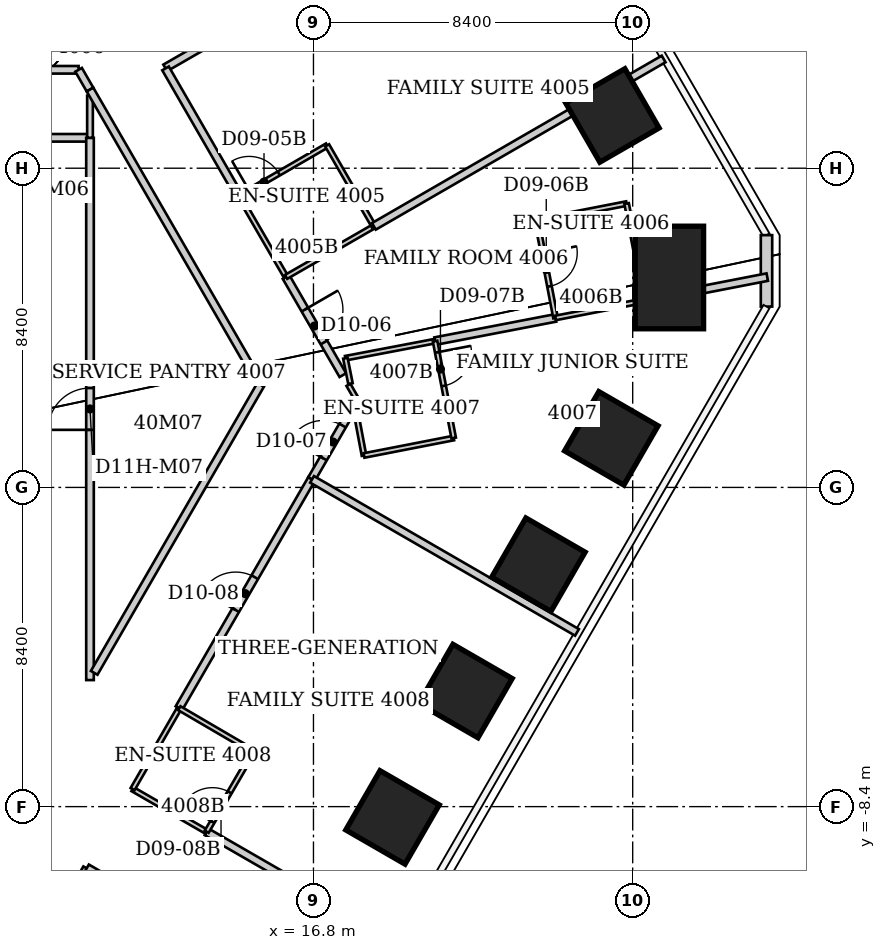
"""IFC4 building model, lengths in metres.
Left out: names, types, materials, properties, quantities, classifications, styles, units other than length and angle.
Written with IfcOpenShell. Run it as: python <this file> out.ifc"""

import sys

from ifc_helpers import new_model, si_unit, direction, frame, frame_2d, origin, origin_2d, place, context, subcontext, project, spatial, rectangle, extrude, element, fill, save


model = new_model("IFC4")
c1 = context("Model", 3, precision=1e-05, world=origin(), true_north=direction((0.0, 1.0)))
c2 = subcontext(c1, "Body", "Model", "MODEL_VIEW")
j1 = project(units=[si_unit("LENGTHUNIT", "METRE"), si_unit("PLANEANGLEUNIT", "RADIAN")], contexts=[c1])
p1 = place(None, origin())
s1 = spatial("IfcSite", under=j1, at=p1, CompositionType="ELEMENT")
p2 = place(p1, origin())
s2 = spatial("IfcBuilding", under=s1, at=p2, CompositionType="ELEMENT")
p3 = place(p2, frame((0.0, 0.0, 161.4)))
s3 = spatial("IfcBuildingStorey", under=s2, at=p3, CompositionType="ELEMENT", Elevation=161.4)
p4 = place(p3, frame((24.665, 9.788, 0.0), z_axis=(-0.055410421986, -0.021997424469, 0.99822131737), x_axis=(0.864198060677, 0.499682708675, 0.058982222519)))
e1 = element("IfcColumn", 1, at=p4, inside=s3, PredefinedType="COLUMN", context=c2, shape_type="SweptSolid", body=[
    extrude(rectangle(XDim=1.8, YDim=1.8, at=origin_2d()), origin(), (0.0, 0.0, 1.0), 3.807),
])
p5 = place(p3, frame((26.166, 5.524, 0.0), z_axis=(-0.06021332392, -0.012696739229, 0.998104778285), x_axis=(0.998185498237, -0.001024676941, 0.060205158806)))
e2 = element("IfcColumn", 2, at=p5, inside=s3, PredefinedType="COLUMN", context=c2, shape_type="SweptSolid", body=[
    extrude(rectangle(XDim=1.8, YDim=2.7, at=origin_2d()), origin(), (0.0, 0.0, 1.0), 3.807),
])
p6 = place(p3, frame((24.638, 1.292, 0.0), z_axis=(-0.056190949949, -0.002950666322, 0.998415680322), x_axis=(0.864380324341, -0.500621456598, 0.047167913724)))
e3 = element("IfcColumn", 3, at=p6, inside=s3, PredefinedType="COLUMN", context=c2, shape_type="SweptSolid", body=[
    extrude(rectangle(XDim=1.8, YDim=1.8, at=origin_2d()), origin(), (0.0, 0.0, 1.0), 3.806),
])
p7 = place(p3, frame((22.719, -2.033, 0.0), z_axis=(-0.05184096697, 0.004683651719, 0.998644369909), x_axis=(0.8641219969, -0.501063474394, 0.047207722912)))
e4 = element("IfcColumn", 4, at=p7, inside=s3, PredefinedType="COLUMN", context=c2, shape_type="SweptSolid", body=[
    extrude(rectangle(XDim=1.8, YDim=1.8, at=origin_2d()), origin(), (0.0, 0.0, 1.0), 3.805),
])
p8 = place(p3, frame((20.8, -5.358, 0.0), z_axis=(-0.047485394503, 0.012192195886, 0.998797520856), x_axis=(0.865155048747, -0.499275895122, 0.047226286935)))
e5 = element("IfcColumn", 5, at=p8, inside=s3, PredefinedType="COLUMN", context=c2, shape_type="SweptSolid", body=[
    extrude(rectangle(XDim=1.8, YDim=1.8, at=origin_2d()), origin(), (0.0, 0.0, 1.0), 3.805),
])
p9 = place(p3, frame((18.88, -8.684, 0.0), z_axis=(-0.043125124656, 0.019829856427, 0.998872864992), x_axis=(0.865002196318, -0.499537256443, 0.047262350669)))
e6 = element("IfcColumn", 6, at=p9, inside=s3, PredefinedType="COLUMN", context=c2, shape_type="SweptSolid", body=[
    extrude(rectangle(XDim=1.8, YDim=1.8, at=origin_2d()), origin(), (0.0, 0.0, 1.0), 3.804),
])
p10 = place(p3, frame((28.721, 6.638, 0.0), z_axis=(0.0, 0.0, 1.0), x_axis=(0.0, -1.0, 0.0)))
e7 = element("IfcWall", 7, at=p10, inside=s3, PredefinedType="SOLIDWALL", context=c2, shape_type="SweptSolid", body=[
    extrude(rectangle(XDim=1.88, YDim=0.3, at=frame_2d((0.94, 0.0))), origin(), (0.0, 0.0, 1.0), 3.64),
])
p11 = place(p3, frame((6.44, 10.99, 0.0), z_axis=(0.0, 0.0, 1.0), x_axis=(1.0, 0.0, 0.0)))
e8 = element("IfcWall", 8, at=p11, inside=s3, PredefinedType="PARTITIONING", context=c2, shape_type="SweptSolid", body=[
    extrude(rectangle(XDim=4.18, YDim=0.2, at=frame_2d((2.09, 0.0))), origin(), (0.0, 0.0, 1.0), 3.64),
])
p12 = place(p3, frame((8.53, -14.01, 0.0), z_axis=(0.0, 0.0, 1.0), x_axis=(0.500091179446, 0.865972754907, 0.0)))
e9 = element("IfcWall", 9, at=p12, inside=s3, PredefinedType="PARTITIONING", context=c2, shape_type="SweptSolid", body=[
    extrude(rectangle(XDim=4.604, YDim=0.2, at=frame_2d((2.302, 0.0))), origin(), (0.0, 0.0, 1.0), 3.64),
])
p13 = place(p3, frame((10.62, 10.99, 0.0), z_axis=(0.0, 0.0, 1.0), x_axis=(0.499464218792, -0.866334516308, 0.0)))
e10 = element("IfcWall", 10, at=p13, inside=s3, PredefinedType="PARTITIONING", context=c2, shape_type="SweptSolid", body=[
    extrude(rectangle(XDim=0.6, YDim=0.2, at=frame_2d((0.3, 0.0))), origin(), (0.0, 0.0, 1.0), 3.64),
])
p14 = place(p3, frame((10.84, -10.01, 0.0), z_axis=(0.0, 0.0, 1.0), x_axis=(0.865552592802, -0.500818039904, 0.0)))
e11 = element("IfcWall", 11, at=p14, inside=s3, PredefinedType="PARTITIONING", context=c2, shape_type="SweptSolid", body=[
    extrude(rectangle(XDim=5.072, YDim=0.2, at=frame_2d((2.536, 0.0))), origin(), (0.0, 0.0, 1.0), 3.64),
])
p15 = place(p14, frame((2.036, 0.0, 0.0)))
e12 = element("IfcOpeningElement", 12, at=p15, cuts=e11, PredefinedType="OPENING", context=c2, shape_type="SweptSolid", body=[
    extrude(rectangle(XDim=1.0, YDim=2.13, at=frame_2d((0.5, 1.065))), frame((0.0, 0.1, 0.0), z_axis=(0.0, -1.0, 0.0), x_axis=(1.0, 0.0, 0.0)), (0.0, 0.0, 1.0), 0.2),
])
p16 = place(p3, frame((10.905, 9.2, 0.0), z_axis=(0.0, 0.0, 1.0), x_axis=(-1.0, 0.0, 0.0)))
e13 = element("IfcWall", 13, at=p16, inside=s3, PredefinedType="PARTITIONING", context=c2, shape_type="SweptSolid", body=[
    extrude(rectangle(XDim=4.465, YDim=0.2, at=frame_2d((2.232, 0.0))), origin(), (0.0, 0.0, 1.0), 3.64),
])
p17 = place(p16, frame((1.683, 0.0, 0.0)))
e14 = element("IfcOpeningElement", 14, at=p17, cuts=e13, PredefinedType="OPENING", context=c2, shape_type="SweptSolid", body=[
    extrude(rectangle(XDim=1.1, YDim=2.2, at=frame_2d((0.55, 1.1))), frame((0.0, 0.1, 0.0), z_axis=(0.0, -1.0, 0.0), x_axis=(1.0, 0.0, 0.0)), (0.0, 0.0, 1.0), 0.2),
])
p18 = place(p3, frame((10.92, -5.07, 0.0), z_axis=(0.0, 0.0, 1.0), x_axis=(0.0, 1.0, 0.0)))
e15 = element("IfcWall", 15, at=p18, inside=s3, PredefinedType="PARTITIONING", context=c2, shape_type="SweptSolid", body=[
    extrude(rectangle(XDim=14.27, YDim=0.2, at=frame_2d((7.135, 0.0))), origin(), (0.0, 0.0, 1.0), 3.64),
])
p19 = place(p18, frame((6.585, 0.0, 0.0)))
e16 = element("IfcOpeningElement", 16, at=p19, cuts=e15, PredefinedType="OPENING", context=c2, shape_type="SweptSolid", body=[
    extrude(rectangle(XDim=1.1, YDim=2.2, at=frame_2d((0.55, 1.1))), frame((0.0, 0.1, 0.0), z_axis=(0.0, -1.0, 0.0), x_axis=(1.0, 0.0, 0.0)), (0.0, 0.0, 1.0), 0.2),
])
p20 = place(p3, frame((10.92, 10.31, 0.0), z_axis=(0.0, 0.0, 1.0), x_axis=(0.0, -1.0, 0.0)))
e17 = element("IfcWall", 17, at=p20, inside=s3, PredefinedType="PARTITIONING", context=c2, shape_type="SweptSolid", body=[
    extrude(rectangle(XDim=1.11, YDim=0.15, at=frame_2d((0.555, 0.0))), origin(), (0.0, 0.0, 1.0), 3.64),
])
p21 = place(p3, frame((10.92, 10.47, 0.0), z_axis=(0.0, 0.0, 1.0), x_axis=(0.500331533983, -0.865833907919, 0.0)))
e18 = element("IfcWall", 18, at=p21, inside=s3, PredefinedType="PARTITIONING", context=c2, shape_type="SweptSolid", body=[
    extrude(rectangle(XDim=8.974, YDim=0.2, at=frame_2d((4.487, 0.0))), origin(), (0.0, 0.0, 1.0), 3.64),
])
p22 = place(p3, frame((12.04, -7.94, 0.0), z_axis=(0.0, 0.0, 1.0), x_axis=(0.866366273901, -0.499409130319, 0.0)))
e19 = element("IfcWall", 19, at=p22, inside=s3, PredefinedType="PARTITIONING", context=c2, shape_type="SweptSolid", body=[
    extrude(rectangle(XDim=2.249, YDim=0.12, at=frame_2d((1.125, 0.0))), origin(), (0.0, 0.0, 1.0), 3.64),
])
p23 = place(p3, frame((12.9, 11.04, 0.0), z_axis=(0.0, 0.0, 1.0), x_axis=(0.86631698263, 0.499494630209, 0.0)))
e20 = element("IfcWall", 20, at=p23, inside=s3, PredefinedType="PARTITIONING", context=c2, shape_type="SweptSolid", body=[
    extrude(rectangle(XDim=8.288, YDim=0.2, at=frame_2d((4.144, 0.0))), origin(), (0.0, 0.0, 1.0), 3.64),
])
p24 = place(p23, frame((3.644, 0.0, 0.0)))
e21 = element("IfcOpeningElement", 21, at=p24, cuts=e20, PredefinedType="OPENING", context=c2, shape_type="SweptSolid", body=[
    extrude(rectangle(XDim=1.0, YDim=2.13, at=frame_2d((0.5, 1.065))), frame((0.0, 0.1, 0.0), z_axis=(0.0, -1.0, 0.0), x_axis=(1.0, 0.0, 0.0)), (0.0, 0.0, 1.0), 0.2),
])
p25 = place(p3, frame((12.907, 11.027, 0.0), z_axis=(0.0, 0.0, 1.0), x_axis=(0.499726078095, -0.86618349492, 0.0)))
e22 = element("IfcWall", 22, at=p25, inside=s3, PredefinedType="PARTITIONING", context=c2, shape_type="SweptSolid", body=[
    extrude(rectangle(XDim=3.887, YDim=0.2, at=frame_2d((1.944, 0.0))), origin(), (0.0, 0.0, 1.0), 3.64),
])
p26 = place(p3, frame((13.26, -5.81, 0.0), z_axis=(0.0, 0.0, 1.0), x_axis=(0.500920236046, 0.865493452962, 0.0)))
e23 = element("IfcWall", 23, at=p26, inside=s3, PredefinedType="PARTITIONING", context=c2, shape_type="SweptSolid", body=[
    extrude(rectangle(XDim=6.967, YDim=0.2, at=frame_2d((3.483, 0.0))), origin(), (0.0, 0.0, 1.0), 3.64),
])
p27 = place(p26, frame((2.984, 0.0, 0.0)))
e24 = element("IfcOpeningElement", 24, at=p27, cuts=e23, PredefinedType="OPENING", context=c2, shape_type="SweptSolid", body=[
    extrude(rectangle(XDim=1.0, YDim=2.13, at=frame_2d((0.5, 1.065))), frame((0.0, 0.1, 0.0), z_axis=(0.0, -1.0, 0.0), x_axis=(1.0, 0.0, 0.0)), (0.0, 0.0, 1.0), 0.2),
])
p28 = place(p3, frame((13.27, -5.81, 0.0), z_axis=(0.0, 0.0, 1.0), x_axis=(-0.500089055364, -0.86597398154, 0.0)))
e25 = element("IfcWall", 25, at=p28, inside=s3, PredefinedType="PARTITIONING", context=c2, shape_type="SweptSolid", body=[
    extrude(rectangle(XDim=2.459, YDim=0.12, at=frame_2d((1.23, 0.0))), origin(), (0.0, 0.0, 1.0), 3.64),
])
p29 = place(p3, frame((13.988, -9.063, 0.0), z_axis=(0.0, 0.0, 1.0), x_axis=(0.86644076383, -0.499279884207, 0.0)))
e26 = element("IfcWall", 26, at=p29, inside=s3, PredefinedType="PARTITIONING", context=c2, shape_type="SweptSolid", body=[
    extrude(rectangle(XDim=2.818, YDim=0.2, at=frame_2d((1.409, 0.0))), origin(), (0.0, 0.0, 1.0), 3.64),
])
p30 = place(p3, frame((13.99, -9.06, 0.0), z_axis=(0.0, 0.0, 1.0), x_axis=(0.503591322258, 0.863942000453, 0.0)))
e27 = element("IfcWall", 27, at=p30, inside=s3, PredefinedType="PARTITIONING", context=c2, shape_type="SweptSolid", body=[
    extrude(rectangle(XDim=2.442, YDim=0.12, at=frame_2d((1.221, 0.0))), origin(), (0.0, 0.0, 1.0), 3.64),
])
p31 = place(p30, frame((0.3, 0.0, 0.0)))
e28 = element("IfcOpeningElement", 28, at=p31, cuts=e27, PredefinedType="OPENING", context=c2, shape_type="SweptSolid", body=[
    extrude(rectangle(XDim=0.9, YDim=2.03, at=frame_2d((0.45, 1.015))), frame((0.0, 0.06, 0.0), z_axis=(0.0, -1.0, 0.0), x_axis=(1.0, 0.0, 0.0)), (0.0, 0.0, 1.0), 0.12),
])
p32 = place(p3, frame((14.85, 7.66, 0.0), z_axis=(0.0, 0.0, 1.0), x_axis=(0.501856726365, -0.86495076519, 0.0)))
e29 = element("IfcWall", 29, at=p32, inside=s3, PredefinedType="PARTITIONING", context=c2, shape_type="SweptSolid", body=[
    extrude(rectangle(XDim=2.451, YDim=0.12, at=frame_2d((1.226, 0.0))), origin(), (0.0, 0.0, 1.0), 3.64),
])
p33 = place(p3, frame((15.22, -6.95, 0.0), z_axis=(0.0, 0.0, 1.0), x_axis=(-0.863312009027, 0.50467056093, 0.0)))
e30 = element("IfcWall", 30, at=p33, inside=s3, PredefinedType="PARTITIONING", context=c2, shape_type="SweptSolid", body=[
    extrude(rectangle(XDim=2.259, YDim=0.12, at=frame_2d((1.129, 0.0))), origin(), (0.0, 0.0, 1.0), 3.64),
])
p34 = place(p3, frame((15.41, 2.7, 0.0), z_axis=(0.0, 0.0, 1.0), x_axis=(-0.50033800158, -0.865830170516, 0.0)))
e31 = element("IfcWall", 31, at=p34, inside=s3, PredefinedType="PARTITIONING", context=c2, shape_type="SweptSolid", body=[
    extrude(rectangle(XDim=8.754, YDim=0.2, at=frame_2d((4.377, 0.0))), origin(), (0.0, 0.0, 1.0), 3.64),
])
p35 = place(p3, frame((16.078, 5.539, 0.0), z_axis=(0.0, 0.0, 1.0), x_axis=(0.500694494545, -0.865624065708, 0.0)))
e32 = element("IfcWall", 32, at=p35, inside=s3, PredefinedType="PARTITIONING", context=c2, shape_type="SweptSolid", body=[
    extrude(rectangle(XDim=2.985, YDim=0.2, at=frame_2d((1.493, 0.0))), origin(), (0.0, 0.0, 1.0), 3.64),
])
p36 = place(p35, frame((0.993, 0.0, 0.0)))
e33 = element("IfcOpeningElement", 33, at=p36, cuts=e32, PredefinedType="OPENING", context=c2, shape_type="SweptSolid", body=[
    extrude(rectangle(XDim=1.0, YDim=2.13, at=frame_2d((0.5, 1.065))), frame((0.0, 0.1, 0.0), z_axis=(0.0, -1.0, 0.0), x_axis=(1.0, 0.0, 0.0)), (0.0, 0.0, 1.0), 0.2),
])
p37 = place(p3, frame((16.08, 5.54, 0.0), z_axis=(0.0, 0.0, 1.0), x_axis=(0.86663205897, 0.498947767172, 0.0)))
e34 = element("IfcWall", 34, at=p37, inside=s3, PredefinedType="PARTITIONING", context=c2, shape_type="SweptSolid", body=[
    extrude(rectangle(XDim=2.665, YDim=0.12, at=frame_2d((1.333, 0.0))), origin(), (0.0, 0.0, 1.0), 3.64),
])
p38 = place(p3, frame((16.75, 0.22, 0.0), z_axis=(0.0, 0.0, 1.0), x_axis=(0.501437604422, 0.865193810006, 0.0)))
e35 = element("IfcWall", 35, at=p38, inside=s3, PredefinedType="PARTITIONING", context=c2, shape_type="SweptSolid", body=[
    extrude(rectangle(XDim=2.254, YDim=0.2, at=frame_2d((1.127, 0.0))), origin(), (0.0, 0.0, 1.0), 3.64),
])
p39 = place(p38, frame((0.627, 0.0, 0.0)))
e36 = element("IfcOpeningElement", 36, at=p39, cuts=e35, PredefinedType="OPENING", context=c2, shape_type="SweptSolid", body=[
    extrude(rectangle(XDim=1.0, YDim=2.13, at=frame_2d((0.5, 1.065))), frame((0.0, 0.1, 0.0), z_axis=(0.0, -1.0, 0.0), x_axis=(1.0, 0.0, 0.0)), (0.0, 0.0, 1.0), 0.2),
])
p40 = place(p3, frame((17.16, 9.0, 0.0), z_axis=(0.0, 0.0, 1.0), x_axis=(-0.864966903181, -0.501828911485, 0.0)))
e37 = element("IfcWall", 37, at=p40, inside=s3, PredefinedType="PARTITIONING", context=c2, shape_type="SweptSolid", body=[
    extrude(rectangle(XDim=2.67, YDim=0.12, at=frame_2d((1.335, 0.0))), origin(), (0.0, 0.0, 1.0), 3.64),
])
p41 = place(p40, frame((1.47, 0.0, 0.0)))
e38 = element("IfcOpeningElement", 38, at=p41, cuts=e37, PredefinedType="OPENING", context=c2, shape_type="SweptSolid", body=[
    extrude(rectangle(XDim=0.9, YDim=2.03, at=frame_2d((0.45, 1.015))), frame((0.0, 0.06, 0.0), z_axis=(0.0, -1.0, 0.0), x_axis=(1.0, 0.0, 0.0)), (0.0, 0.0, 1.0), 0.12),
])
p42 = place(p3, frame((17.64, 3.4, 0.0), z_axis=(0.0, 0.0, 1.0), x_axis=(0.982288725898, 0.187373581313, 0.0)))
e39 = element("IfcWall", 39, at=p42, inside=s3, PredefinedType="PARTITIONING", context=c2, shape_type="SweptSolid", body=[
    extrude(rectangle(XDim=2.403, YDim=0.12, at=frame_2d((1.201, 0.0))), origin(), (0.0, 0.0, 1.0), 3.64),
])
p43 = place(p3, frame((17.72, 2.7, 0.0), z_axis=(0.0, 0.0, 1.0), x_axis=(0.498530782172, -0.866871997025, 0.0)))
e40 = element("IfcWall", 40, at=p43, inside=s3, PredefinedType="PARTITIONING", context=c2, shape_type="SweptSolid", body=[
    extrude(rectangle(XDim=0.461, YDim=0.12, at=frame_2d((0.231, 0.0))), origin(), (0.0, 0.0, 1.0), 3.64),
])
p44 = place(p3, frame((17.774, 2.731, 0.0), z_axis=(0.0, 0.0, 1.0), x_axis=(-0.196253874553, 0.980553117747, 0.0)))
e41 = element("IfcWall", 41, at=p44, inside=s3, PredefinedType="PARTITIONING", context=c2, shape_type="SweptSolid", body=[
    extrude(rectangle(XDim=0.682, YDim=0.12, at=frame_2d((0.341, 0.0))), origin(), (0.0, 0.0, 1.0), 3.64),
])
p45 = place(p3, frame((17.88, 2.17, 0.0), z_axis=(0.0, 0.0, 1.0), x_axis=(0.474099823035, 0.880471099922, 0.0)))
e42 = element("IfcWall", 42, at=p45, inside=s3, PredefinedType="PARTITIONING", context=c2, shape_type="SweptSolid", body=[
    extrude(rectangle(XDim=0.148, YDim=0.12, at=frame_2d((0.074, 0.0))), origin(), (0.0, 0.0, 1.0), 3.64),
])
p46 = place(p3, frame((17.897, 2.082, 0.0), z_axis=(0.0, 0.0, 1.0), x_axis=(0.184580266957, -0.982817442382, 0.0)))
e43 = element("IfcWall", 43, at=p46, inside=s3, PredefinedType="PARTITIONING", context=c2, shape_type="SweptSolid", body=[
    extrude(rectangle(XDim=1.263, YDim=0.12, at=frame_2d((0.632, 0.0))), origin(), (0.0, 0.0, 1.0), 3.64),
])
p47 = place(p3, frame((18.13, 0.84, 0.0), z_axis=(0.0, 0.0, 1.0), x_axis=(0.981533392326, 0.191290877329, 0.0)))
e44 = element("IfcWall", 44, at=p47, inside=s3, PredefinedType="PARTITIONING", context=c2, shape_type="SweptSolid", body=[
    extrude(rectangle(XDim=2.405, YDim=0.12, at=frame_2d((1.202, 0.0))), origin(), (0.0, 0.0, 1.0), 3.64),
])
p48 = place(p3, frame((18.39, 6.87, 0.0), z_axis=(0.0, 0.0, 1.0), x_axis=(-0.500089055364, 0.86597398154, 0.0)))
e45 = element("IfcWall", 45, at=p48, inside=s3, PredefinedType="PARTITIONING", context=c2, shape_type="SweptSolid", body=[
    extrude(rectangle(XDim=2.459, YDim=0.12, at=frame_2d((1.23, 0.0))), origin(), (0.0, 0.0, 1.0), 3.64),
])
p49 = place(p3, frame((18.39, 6.87, 0.0), z_axis=(0.0, 0.0, 1.0), x_axis=(0.865875215531, 0.500260043506, 0.0)))
e46 = element("IfcWall", 46, at=p49, inside=s3, PredefinedType="PARTITIONING", context=c2, shape_type="SweptSolid", body=[
    extrude(rectangle(XDim=8.805, YDim=0.2, at=frame_2d((4.402, 0.0))), origin(), (0.0, 0.0, 1.0), 3.64),
])
p50 = place(p3, frame((20.0, 3.85, 0.0), z_axis=(0.0, 0.0, 1.0), x_axis=(0.981991339242, 0.188925936955, 0.0)))
e47 = element("IfcWall", 47, at=p50, inside=s3, PredefinedType="PARTITIONING", context=c2, shape_type="SweptSolid", body=[
    extrude(rectangle(XDim=3.228, YDim=0.2, at=frame_2d((1.614, 0.0))), origin(), (0.0, 0.0, 1.0), 3.64),
])
p51 = place(p3, frame((20.49, 1.3, 0.0), z_axis=(0.0, 0.0, 1.0), x_axis=(-0.188697442844, 0.982035271802, 0.0)))
e48 = element("IfcWall", 48, at=p51, inside=s3, PredefinedType="PARTITIONING", context=c2, shape_type="SweptSolid", body=[
    extrude(rectangle(XDim=2.597, YDim=0.12, at=frame_2d((1.298, 0.0))), origin(), (0.0, 0.0, 1.0), 3.64),
])
p52 = place(p51, frame((1.397, 0.0, 0.0)))
e49 = element("IfcOpeningElement", 49, at=p52, cuts=e48, PredefinedType="OPENING", context=c2, shape_type="SweptSolid", body=[
    extrude(rectangle(XDim=0.9, YDim=2.03, at=frame_2d((0.45, 1.015))), frame((0.0, 0.06, 0.0), z_axis=(0.0, -1.0, 0.0), x_axis=(1.0, 0.0, 0.0)), (0.0, 0.0, 1.0), 0.12),
])
p53 = place(p3, frame((22.68, 7.01, 0.0), z_axis=(0.0, 0.0, 1.0), x_axis=(0.188697442844, -0.982035271802, 0.0)))
e50 = element("IfcWall", 50, at=p53, inside=s3, PredefinedType="PARTITIONING", context=c2, shape_type="SweptSolid", body=[
    extrude(rectangle(XDim=2.597, YDim=0.12, at=frame_2d((1.298, 0.0))), origin(), (0.0, 0.0, 1.0), 3.64),
])
p54 = place(p53, frame((0.85, 0.0, 0.0)))
e51 = element("IfcOpeningElement", 51, at=p54, cuts=e50, PredefinedType="OPENING", context=c2, shape_type="SweptSolid", body=[
    extrude(rectangle(XDim=0.9, YDim=2.03, at=frame_2d((0.45, 1.015))), frame((0.0, 0.06, 0.0), z_axis=(0.0, -1.0, 0.0), x_axis=(1.0, 0.0, 0.0)), (0.0, 0.0, 1.0), 0.12),
])
p55 = place(p3, frame((23.17, 4.46, 0.0), z_axis=(0.0, 0.0, 1.0), x_axis=(0.981533392326, 0.191290877329, 0.0)))
e52 = element("IfcWall", 52, at=p55, inside=s3, PredefinedType="PARTITIONING", context=c2, shape_type="SweptSolid", body=[
    extrude(rectangle(XDim=2.405, YDim=0.12, at=frame_2d((1.202, 0.0))), origin(), (0.0, 0.0, 1.0), 3.64),
])
p56 = place(p3, frame((23.734, -3.815, 0.0), z_axis=(0.0, 0.0, 1.0), x_axis=(-0.865889592382, 0.500235158505, 0.0)))
e53 = element("IfcWall", 53, at=p56, inside=s3, PredefinedType="PARTITIONING", context=c2, shape_type="SweptSolid", body=[
    extrude(rectangle(XDim=8.051, YDim=0.2, at=frame_2d((4.025, 0.0))), origin(), (0.0, 0.0, 1.0), 3.64),
])
p57 = place(p3, frame((25.04, 7.47, 0.0), z_axis=(0.0, 0.0, 1.0), x_axis=(-0.981533392326, -0.191290877329, 0.0)))
e54 = element("IfcWall", 54, at=p57, inside=s3, PredefinedType="PARTITIONING", context=c2, shape_type="SweptSolid", body=[
    extrude(rectangle(XDim=2.405, YDim=0.12, at=frame_2d((1.202, 0.0))), origin(), (0.0, 0.0, 1.0), 3.64),
])
p58 = place(p3, frame((25.53, 4.92, 0.0), z_axis=(0.0, 0.0, 1.0), x_axis=(-0.188697442844, 0.982035271802, 0.0)))
e55 = element("IfcWall", 55, at=p58, inside=s3, PredefinedType="PARTITIONING", context=c2, shape_type="SweptSolid", body=[
    extrude(rectangle(XDim=2.597, YDim=0.12, at=frame_2d((1.298, 0.0))), origin(), (0.0, 0.0, 1.0), 1.84),
])
p59 = place(p3, frame((28.74, 5.534, 0.0), z_axis=(0.0, 0.0, 1.0), x_axis=(-0.98161461266, -0.190873655101, 0.0)))
e56 = element("IfcWall", 56, at=p59, inside=s3, PredefinedType="PARTITIONING", context=c2, shape_type="SweptSolid", body=[
    extrude(rectangle(XDim=3.271, YDim=0.2, at=frame_2d((1.635, 0.0))), origin(), (0.0, 0.0, 1.0), 3.64),
])
p60 = place(p41, origin())
e57 = element("IfcDoor", 57, at=p60, inside=s3, OperationType="SINGLE_SWING_RIGHT", PredefinedType="DOOR", context=c2, shape_type="SweptSolid", body=[
    extrude(rectangle(XDim=0.9, YDim=2.03, at=frame_2d((0.45, 1.015))), frame((0.0, 0.025, 0.0), z_axis=(0.0, -1.0, 0.0), x_axis=(1.0, 0.0, 0.0)), (0.0, 0.0, 1.0), 0.05),
])
fill(e38, e57)
p61 = place(p36, origin())
e58 = element("IfcDoor", 58, at=p61, inside=s3, OperationType="SINGLE_SWING_LEFT", PredefinedType="DOOR", context=c2, shape_type="SweptSolid", body=[
    extrude(rectangle(XDim=1.0, YDim=2.13, at=frame_2d((0.5, 1.065))), frame((0.0, 0.025, 0.0), z_axis=(0.0, -1.0, 0.0), x_axis=(1.0, 0.0, 0.0)), (0.0, 0.0, 1.0), 0.05),
])
fill(e33, e58)
p62 = place(p54, origin())
e59 = element("IfcDoor", 59, at=p62, inside=s3, OperationType="SINGLE_SWING_LEFT", PredefinedType="DOOR", context=c2, shape_type="SweptSolid", body=[
    extrude(rectangle(XDim=0.9, YDim=2.03, at=frame_2d((0.45, 1.015))), frame((0.0, 0.025, 0.0), z_axis=(0.0, -1.0, 0.0), x_axis=(1.0, 0.0, 0.0)), (0.0, 0.0, 1.0), 0.05),
])
fill(e51, e59)
p63 = place(p39, origin())
e60 = element("IfcDoor", 60, at=p63, inside=s3, OperationType="SINGLE_SWING_LEFT", PredefinedType="DOOR", context=c2, shape_type="SweptSolid", body=[
    extrude(rectangle(XDim=1.0, YDim=2.13, at=frame_2d((0.5, 1.065))), frame((0.0, 0.025, 0.0), z_axis=(0.0, -1.0, 0.0), x_axis=(1.0, 0.0, 0.0)), (0.0, 0.0, 1.0), 0.05),
])
fill(e36, e60)
p64 = place(p52, origin())
e61 = element("IfcDoor", 61, at=p64, inside=s3, OperationType="SINGLE_SWING_RIGHT", PredefinedType="DOOR", context=c2, shape_type="SweptSolid", body=[
    extrude(rectangle(XDim=0.9, YDim=2.03, at=frame_2d((0.45, 1.015))), frame((0.0, 0.025, 0.0), z_axis=(0.0, -1.0, 0.0), x_axis=(1.0, 0.0, 0.0)), (0.0, 0.0, 1.0), 0.05),
])
fill(e49, e61)
p65 = place(p27, origin())
e62 = element("IfcDoor", 62, at=p65, inside=s3, OperationType="SINGLE_SWING_LEFT", PredefinedType="DOOR", context=c2, shape_type="SweptSolid", body=[
    extrude(rectangle(XDim=1.0, YDim=2.13, at=frame_2d((0.5, 1.065))), frame((0.0, 0.025, 0.0), z_axis=(0.0, -1.0, 0.0), x_axis=(1.0, 0.0, 0.0)), (0.0, 0.0, 1.0), 0.05),
])
fill(e24, e62)
p66 = place(p31, origin())
e63 = element("IfcDoor", 63, at=p66, inside=s3, OperationType="SINGLE_SWING_LEFT", PredefinedType="DOOR", context=c2, shape_type="SweptSolid", body=[
    extrude(rectangle(XDim=0.9, YDim=2.03, at=frame_2d((0.45, 1.015))), frame((0.0, 0.025, 0.0), z_axis=(0.0, -1.0, 0.0), x_axis=(1.0, 0.0, 0.0)), (0.0, 0.0, 1.0), 0.05),
])
fill(e28, e63)
p67 = place(p19, origin())
e64 = element("IfcDoor", 64, at=p67, inside=s3, OperationType="SINGLE_SWING_LEFT", PredefinedType="DOOR", context=c2, shape_type="SweptSolid", body=[
    extrude(rectangle(XDim=1.1, YDim=2.2, at=frame_2d((0.55, 1.1))), frame((0.0, 0.025, 0.0), z_axis=(0.0, -1.0, 0.0), x_axis=(1.0, 0.0, 0.0)), (0.0, 0.0, 1.0), 0.05),
])
fill(e16, e64)
save(model, sys.argv[1])
